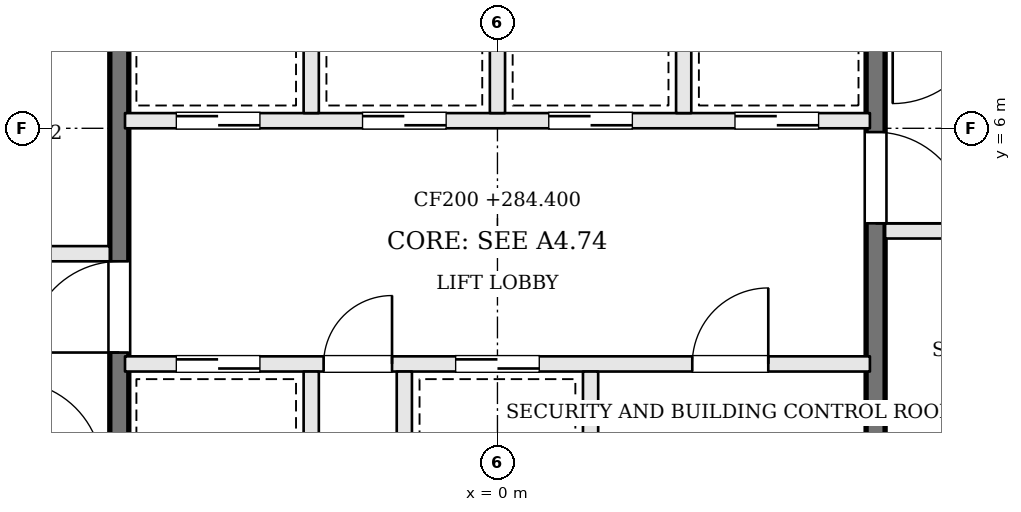
"""IFC4 building model, lengths in metres.
Left out: names, types, materials, properties, quantities, classifications, styles, units other than length and angle.
Written with IfcOpenShell. Run it as: python <this file> out.ifc"""

import sys

from ifc_helpers import new_model, si_unit, direction, frame, frame_2d, origin, place, context, subcontext, project, spatial, rectangle, extrude, element, fill, save


model = new_model("IFC4")
c1 = context("Model", 3, precision=1e-05, world=origin(), true_north=direction((0.0, 1.0)))
c2 = subcontext(c1, "Body", "Model", "MODEL_VIEW")
j1 = project(units=[si_unit("LENGTHUNIT", "METRE"), si_unit("PLANEANGLEUNIT", "RADIAN")], contexts=[c1])
p1 = place(None, origin())
s1 = spatial("IfcSite", under=j1, at=p1, CompositionType="ELEMENT")
p2 = place(p1, origin())
s2 = spatial("IfcBuilding", under=s1, at=p2, CompositionType="ELEMENT")
p3 = place(p2, frame((0.0, 0.0, 284.4)))
s3 = spatial("IfcBuildingStorey", under=s2, at=p3, CompositionType="ELEMENT", Elevation=284.4)
p4 = place(p3, frame((-12.2, 4.35, 0.0), z_axis=(0.0, 0.0, 1.0), x_axis=(1.0, 0.0, 0.0)))
e1 = element("IfcWall", 1, at=p4, inside=s3, PredefinedType="SOLIDWALL", context=c2, shape_type="SweptSolid", body=[
    extrude(rectangle(XDim=7.1, YDim=0.2, at=frame_2d((3.55, 0.0))), origin(), (0.0, 0.0, 1.0), 3.7),
])
p5 = place(p4, frame((4.4, 0.0, 0.0)))
e2 = element("IfcOpeningElement", 2, at=p5, cuts=e1, PredefinedType="OPENING", context=c2, shape_type="SweptSolid", body=[
    extrude(rectangle(XDim=1.2, YDim=2.1, at=frame_2d((0.6, 1.05))), frame((0.0, 0.11, 0.0), z_axis=(0.0, -1.0, 0.0), x_axis=(1.0, 0.0, 0.0)), (0.0, 0.0, 1.0), 0.22),
])
p6 = place(p4, frame((1.1, 0.0, 0.0)))
e3 = element("IfcOpeningElement", 3, at=p6, cuts=e1, PredefinedType="OPENING", context=c2, shape_type="SweptSolid", body=[
    extrude(rectangle(XDim=1.2, YDim=2.1, at=frame_2d((0.6, 1.05))), frame((0.0, 0.11, 0.0), z_axis=(0.0, -1.0, 0.0), x_axis=(1.0, 0.0, 0.0)), (0.0, 0.0, 1.0), 0.22),
])
p7 = place(p3, frame((12.2, 4.65, 0.0), z_axis=(0.0, 0.0, 1.0), x_axis=(-1.0, 0.0, 0.0)))
e4 = element("IfcWall", 4, at=p7, inside=s3, PredefinedType="SOLIDWALL", context=c2, shape_type="SweptSolid", body=[
    extrude(rectangle(XDim=7.1, YDim=0.2, at=frame_2d((3.55, 0.0))), origin(), (0.0, 0.0, 1.0), 3.7),
])
p8 = place(p7, frame((4.4, 0.0, 0.0)))
e5 = element("IfcOpeningElement", 5, at=p8, cuts=e4, PredefinedType="OPENING", context=c2, shape_type="SweptSolid", body=[
    extrude(rectangle(XDim=1.2, YDim=2.1, at=frame_2d((0.6, 1.05))), frame((0.0, 0.11, 0.0), z_axis=(0.0, -1.0, 0.0), x_axis=(1.0, 0.0, 0.0)), (0.0, 0.0, 1.0), 0.22),
])
p9 = place(p7, frame((1.1, 0.0, 0.0)))
e6 = element("IfcOpeningElement", 6, at=p9, cuts=e4, PredefinedType="OPENING", context=c2, shape_type="SweptSolid", body=[
    extrude(rectangle(XDim=1.2, YDim=2.1, at=frame_2d((0.6, 1.05))), frame((0.0, 0.11, 0.0), z_axis=(0.0, -1.0, 0.0), x_axis=(1.0, 0.0, 0.0)), (0.0, 0.0, 1.0), 0.22),
])
p10 = place(p3, frame((-4.975, -2.2, 0.0), z_axis=(0.0, 0.0, 1.0), x_axis=(0.0, 1.0, 0.0)))
e7 = element("IfcWall", 7, at=p10, inside=s3, PredefinedType="SOLIDWALL", context=c2, shape_type="SweptSolid", body=[
    extrude(rectangle(XDim=13.4, YDim=0.25, at=frame_2d((6.7, 0.0))), origin(), (0.0, 0.0, 1.0), 3.7),
])
p11 = place(p10, frame((5.25, 0.0, 0.0)))
e8 = element("IfcOpeningElement", 8, at=p11, cuts=e7, PredefinedType="OPENING", context=c2, shape_type="SweptSolid", body=[
    extrude(rectangle(XDim=1.2, YDim=2.1, at=frame_2d((0.6, 1.05))), frame((0.0, 0.135, 0.0), z_axis=(0.0, -1.0, 0.0), x_axis=(1.0, 0.0, 0.0)), (0.0, 0.0, 1.0), 0.27),
])
p12 = place(p3, frame((4.975, 11.2, 0.0), z_axis=(0.0, 0.0, 1.0), x_axis=(0.0, -1.0, 0.0)))
e9 = element("IfcWall", 9, at=p12, inside=s3, PredefinedType="SOLIDWALL", context=c2, shape_type="SweptSolid", body=[
    extrude(rectangle(XDim=13.4, YDim=0.25, at=frame_2d((6.7, 0.0))), origin(), (0.0, 0.0, 1.0), 3.7),
])
p13 = place(p12, frame((5.25, 0.0, 0.0)))
e10 = element("IfcOpeningElement", 10, at=p13, cuts=e9, PredefinedType="OPENING", context=c2, shape_type="SweptSolid", body=[
    extrude(rectangle(XDim=1.2, YDim=2.1, at=frame_2d((0.6, 1.05))), frame((0.0, 0.135, 0.0), z_axis=(0.0, -1.0, 0.0), x_axis=(1.0, 0.0, 0.0)), (0.0, 0.0, 1.0), 0.27),
])
p14 = place(p3, frame((-4.9, 2.9, 0.0), z_axis=(0.0, 0.0, 1.0), x_axis=(1.0, 0.0, 0.0)))
e11 = element("IfcWall", 11, at=p14, inside=s3, PredefinedType="SOLIDWALL", context=c2, shape_type="SweptSolid", body=[
    extrude(rectangle(XDim=9.8, YDim=0.2, at=frame_2d((4.9, 0.0))), origin(), (0.0, 0.0, 1.0), 3.7),
])
p15 = place(p14, frame((0.675, 0.0, 0.0)))
e12 = element("IfcOpeningElement", 12, at=p15, cuts=e11, PredefinedType="OPENING", context=c2, shape_type="SweptSolid", body=[
    extrude(rectangle(XDim=1.1, YDim=2.1, at=frame_2d((0.55, 1.05))), frame((0.0, 0.11, 0.0), z_axis=(0.0, -1.0, 0.0), x_axis=(1.0, 0.0, 0.0)), (0.0, 0.0, 1.0), 0.22),
])
p16 = place(p14, frame((2.613, 0.0, 0.0)))
e13 = element("IfcOpeningElement", 13, at=p16, cuts=e11, PredefinedType="OPENING", context=c2, shape_type="SweptSolid", body=[
    extrude(rectangle(XDim=0.9, YDim=2.1, at=frame_2d((0.45, 1.05))), frame((0.0, 0.11, 0.0), z_axis=(0.0, -1.0, 0.0), x_axis=(1.0, 0.0, 0.0)), (0.0, 0.0, 1.0), 0.22),
])
p17 = place(p14, frame((4.35, 0.0, 0.0)))
e14 = element("IfcOpeningElement", 14, at=p17, cuts=e11, PredefinedType="OPENING", context=c2, shape_type="SweptSolid", body=[
    extrude(rectangle(XDim=1.1, YDim=2.1, at=frame_2d((0.55, 1.05))), frame((0.0, 0.11, 0.0), z_axis=(0.0, -1.0, 0.0), x_axis=(1.0, 0.0, 0.0)), (0.0, 0.0, 1.0), 0.22),
])
p18 = place(p14, frame((7.463, 0.0, 0.0)))
e15 = element("IfcOpeningElement", 15, at=p18, cuts=e11, PredefinedType="OPENING", context=c2, shape_type="SweptSolid", body=[
    extrude(rectangle(XDim=1.0, YDim=2.1, at=frame_2d((0.5, 1.05))), frame((0.0, 0.11, 0.0), z_axis=(0.0, -1.0, 0.0), x_axis=(1.0, 0.0, 0.0)), (0.0, 0.0, 1.0), 0.22),
])
p19 = place(p3, frame((-4.9, 6.1, 0.0), z_axis=(0.0, 0.0, 1.0), x_axis=(1.0, 0.0, 0.0)))
e16 = element("IfcWall", 16, at=p19, inside=s3, PredefinedType="SOLIDWALL", context=c2, shape_type="SweptSolid", body=[
    extrude(rectangle(XDim=9.8, YDim=0.2, at=frame_2d((4.9, 0.0))), origin(), (0.0, 0.0, 1.0), 3.7),
])
p20 = place(p19, frame((0.675, 0.0, 0.0)))
e17 = element("IfcOpeningElement", 17, at=p20, cuts=e16, PredefinedType="OPENING", context=c2, shape_type="SweptSolid", body=[
    extrude(rectangle(XDim=1.1, YDim=2.1, at=frame_2d((0.55, 1.05))), frame((0.0, 0.11, 0.0), z_axis=(0.0, -1.0, 0.0), x_axis=(1.0, 0.0, 0.0)), (0.0, 0.0, 1.0), 0.22),
])
p21 = place(p19, frame((3.125, 0.0, 0.0)))
e18 = element("IfcOpeningElement", 18, at=p21, cuts=e16, PredefinedType="OPENING", context=c2, shape_type="SweptSolid", body=[
    extrude(rectangle(XDim=1.1, YDim=2.1, at=frame_2d((0.55, 1.05))), frame((0.0, 0.11, 0.0), z_axis=(0.0, -1.0, 0.0), x_axis=(1.0, 0.0, 0.0)), (0.0, 0.0, 1.0), 0.22),
])
p22 = place(p19, frame((5.575, 0.0, 0.0)))
e19 = element("IfcOpeningElement", 19, at=p22, cuts=e16, PredefinedType="OPENING", context=c2, shape_type="SweptSolid", body=[
    extrude(rectangle(XDim=1.1, YDim=2.1, at=frame_2d((0.55, 1.05))), frame((0.0, 0.11, 0.0), z_axis=(0.0, -1.0, 0.0), x_axis=(1.0, 0.0, 0.0)), (0.0, 0.0, 1.0), 0.22),
])
p23 = place(p19, frame((8.025, 0.0, 0.0)))
e20 = element("IfcOpeningElement", 20, at=p23, cuts=e16, PredefinedType="OPENING", context=c2, shape_type="SweptSolid", body=[
    extrude(rectangle(XDim=1.1, YDim=2.1, at=frame_2d((0.55, 1.05))), frame((0.0, 0.11, 0.0), z_axis=(0.0, -1.0, 0.0), x_axis=(1.0, 0.0, 0.0)), (0.0, 0.0, 1.0), 0.22),
])
for number, where, z_axis, x_axis in (
    (21, (-2.45, 0.6, 0.0), (0.0, 0.0, 1.0), (0.0, 1.0, 0.0)),
    (22, (-1.225, 0.6, 0.0), (0.0, 0.0, 1.0), (0.0, 1.0, 0.0)),
    (23, (1.225, 0.6, 0.0), (0.0, 0.0, 1.0), (0.0, 1.0, 0.0)),
    (24, (-2.45, 6.2, 0.0), (0.0, 0.0, 1.0), (0.0, 1.0, 0.0)),
    (25, (0.0, 6.2, 0.0), (0.0, 0.0, 1.0), (0.0, 1.0, 0.0)),
    (26, (2.45, 6.2, 0.0), (0.0, 0.0, 1.0), (0.0, 1.0, 0.0)),
):
    element("IfcWall", number, at=place(p3, frame(where, z_axis=z_axis, x_axis=x_axis)), inside=s3, PredefinedType="SOLIDWALL", context=c2, shape_type="SweptSolid", body=[
        extrude(rectangle(XDim=2.2, YDim=0.2, at=frame_2d((1.1, 0.0))), origin(), (0.0, 0.0, 1.0), 3.7),
    ])
p24 = place(p11, origin())
e27 = element("IfcDoor", 27, at=p24, inside=s3, OperationType="SINGLE_SWING_LEFT", PredefinedType="DOOR", context=c2, shape_type="SweptSolid", body=[
    extrude(rectangle(XDim=1.2, YDim=2.1, at=frame_2d((0.6, 1.05))), frame((0.0, 0.025, 0.0), z_axis=(0.0, -1.0, 0.0), x_axis=(1.0, 0.0, 0.0)), (0.0, 0.0, 1.0), 0.05),
])
fill(e8, e27)
p25 = place(p13, origin())
e28 = element("IfcDoor", 28, at=p25, inside=s3, OperationType="SINGLE_SWING_RIGHT", PredefinedType="DOOR", context=c2, shape_type="SweptSolid", body=[
    extrude(rectangle(XDim=1.2, YDim=2.1, at=frame_2d((0.6, 1.05))), frame((0.0, 0.025, 0.0), z_axis=(0.0, -1.0, 0.0), x_axis=(1.0, 0.0, 0.0)), (0.0, 0.0, 1.0), 0.05),
])
fill(e10, e28)
p26 = place(p15, origin())
e29 = element("IfcDoor", 29, at=p26, inside=s3, OperationType="SLIDING_TO_RIGHT", PredefinedType="DOOR", context=c2, shape_type="SweptSolid", body=[
    extrude(rectangle(XDim=1.1, YDim=2.1, at=frame_2d((0.55, 1.05))), frame((0.0, 0.025, 0.0), z_axis=(0.0, -1.0, 0.0), x_axis=(1.0, 0.0, 0.0)), (0.0, 0.0, 1.0), 0.05),
])
fill(e12, e29)
p27 = place(p16, origin())
e30 = element("IfcDoor", 30, at=p27, inside=s3, OperationType="SINGLE_SWING_RIGHT", PredefinedType="DOOR", context=c2, shape_type="SweptSolid", body=[
    extrude(rectangle(XDim=0.9, YDim=2.1, at=frame_2d((0.45, 1.05))), frame((0.0, 0.025, 0.0), z_axis=(0.0, -1.0, 0.0), x_axis=(1.0, 0.0, 0.0)), (0.0, 0.0, 1.0), 0.05),
])
fill(e13, e30)
p28 = place(p17, origin())
e31 = element("IfcDoor", 31, at=p28, inside=s3, OperationType="SLIDING_TO_LEFT", PredefinedType="DOOR", context=c2, shape_type="SweptSolid", body=[
    extrude(rectangle(XDim=1.1, YDim=2.1, at=frame_2d((0.55, 1.05))), frame((0.0, 0.025, 0.0), z_axis=(0.0, -1.0, 0.0), x_axis=(1.0, 0.0, 0.0)), (0.0, 0.0, 1.0), 0.05),
])
fill(e14, e31)
p29 = place(p18, origin())
e32 = element("IfcDoor", 32, at=p29, inside=s3, OperationType="SINGLE_SWING_RIGHT", PredefinedType="DOOR", context=c2, shape_type="SweptSolid", body=[
    extrude(rectangle(XDim=1.0, YDim=2.1, at=frame_2d((0.5, 1.05))), frame((0.0, 0.025, 0.0), z_axis=(0.0, -1.0, 0.0), x_axis=(1.0, 0.0, 0.0)), (0.0, 0.0, 1.0), 0.05),
])
fill(e15, e32)
p30 = place(p20, origin())
e33 = element("IfcDoor", 33, at=p30, inside=s3, OperationType="SLIDING_TO_RIGHT", PredefinedType="DOOR", context=c2, shape_type="SweptSolid", body=[
    extrude(rectangle(XDim=1.1, YDim=2.1, at=frame_2d((0.55, 1.05))), frame((0.0, 0.025, 0.0), z_axis=(0.0, -1.0, 0.0), x_axis=(1.0, 0.0, 0.0)), (0.0, 0.0, 1.0), 0.05),
])
fill(e17, e33)
p31 = place(p21, origin())
e34 = element("IfcDoor", 34, at=p31, inside=s3, OperationType="SLIDING_TO_LEFT", PredefinedType="DOOR", context=c2, shape_type="SweptSolid", body=[
    extrude(rectangle(XDim=1.1, YDim=2.1, at=frame_2d((0.55, 1.05))), frame((0.0, 0.025, 0.0), z_axis=(0.0, -1.0, 0.0), x_axis=(1.0, 0.0, 0.0)), (0.0, 0.0, 1.0), 0.05),
])
fill(e18, e34)
p32 = place(p22, origin())
e35 = element("IfcDoor", 35, at=p32, inside=s3, OperationType="SLIDING_TO_RIGHT", PredefinedType="DOOR", context=c2, shape_type="SweptSolid", body=[
    extrude(rectangle(XDim=1.1, YDim=2.1, at=frame_2d((0.55, 1.05))), frame((0.0, 0.025, 0.0), z_axis=(0.0, -1.0, 0.0), x_axis=(1.0, 0.0, 0.0)), (0.0, 0.0, 1.0), 0.05),
])
fill(e19, e35)
p33 = place(p23, origin())
e36 = element("IfcDoor", 36, at=p33, inside=s3, OperationType="SLIDING_TO_LEFT", PredefinedType="DOOR", context=c2, shape_type="SweptSolid", body=[
    extrude(rectangle(XDim=1.1, YDim=2.1, at=frame_2d((0.55, 1.05))), frame((0.0, 0.025, 0.0), z_axis=(0.0, -1.0, 0.0), x_axis=(1.0, 0.0, 0.0)), (0.0, 0.0, 1.0), 0.05),
])
fill(e20, e36)
save(model, sys.argv[1])
